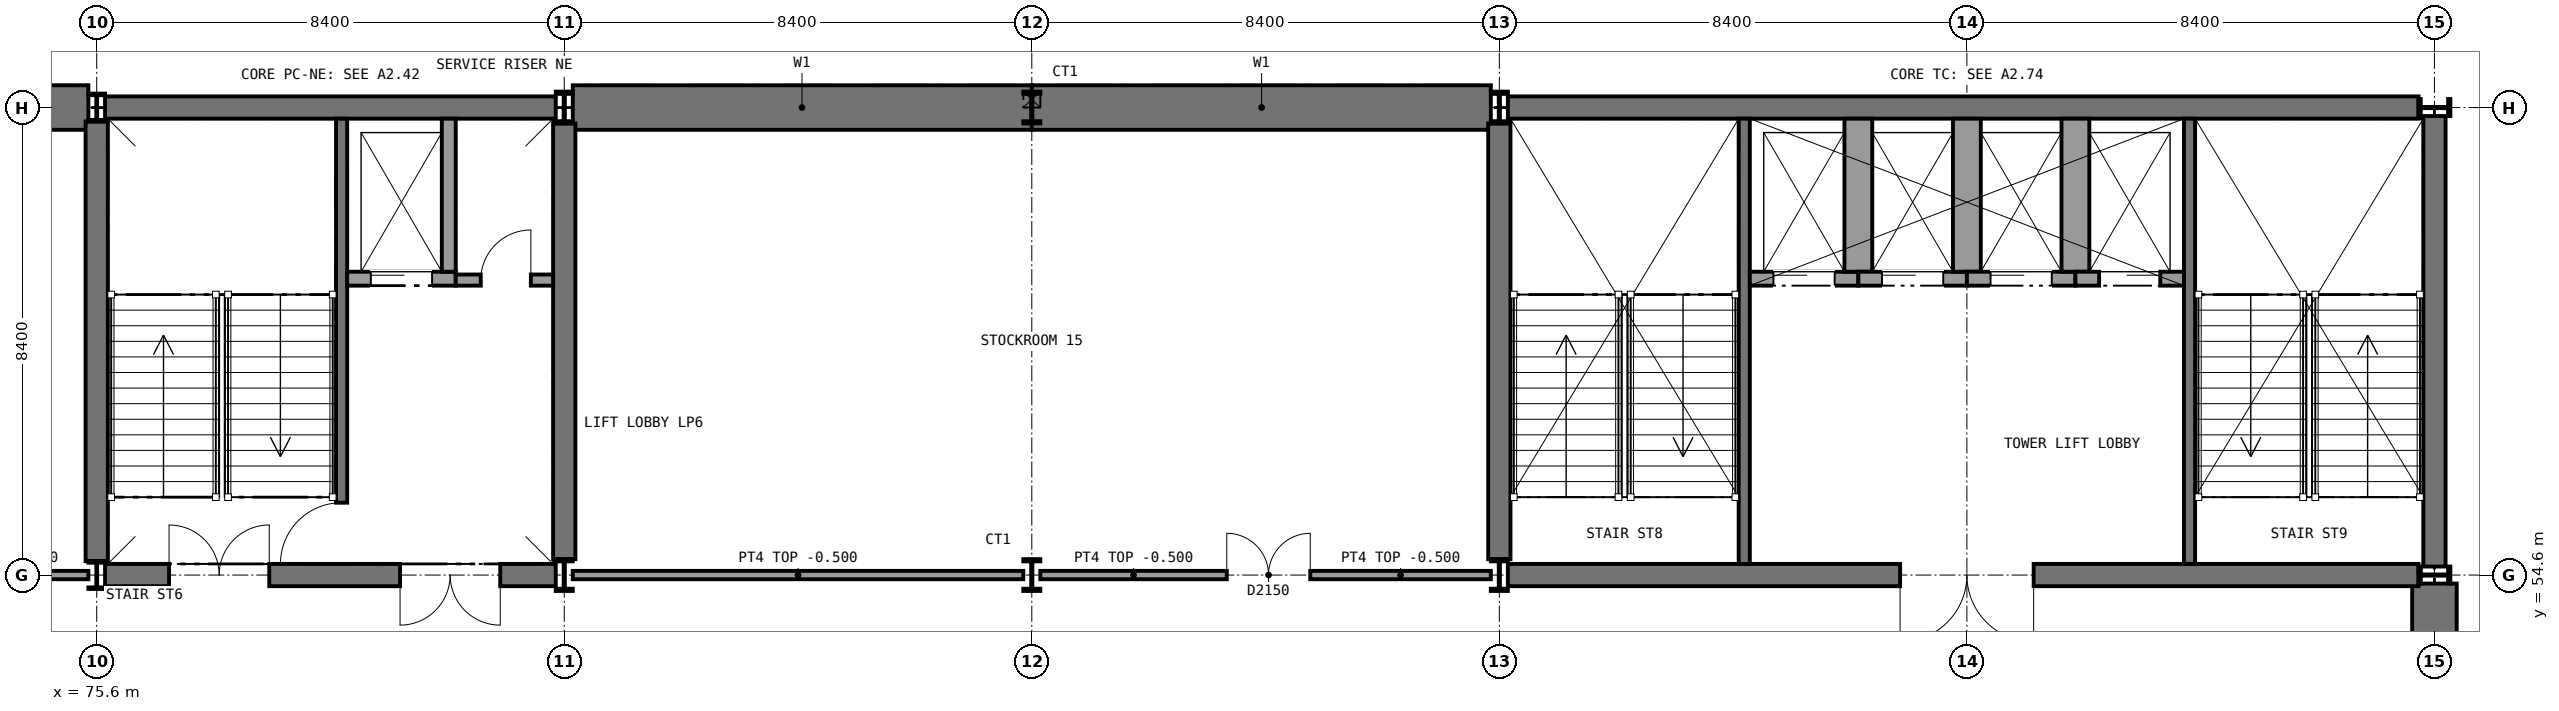
"""IFC4 building model, lengths in metres.
Left out: names, types, materials, properties, quantities, classifications, styles, units other than length and angle.
Written with IfcOpenShell. Run it as: python <this file> out.ifc"""

import sys

from ifc_helpers import new_model, si_unit, direction, frame, frame_2d, origin, origin_2d, place, context, subcontext, project, spatial, rectangle, i_section, extrude, element, fill, save


model = new_model("IFC4")
c1 = context("Model", 3, precision=1e-05, world=origin(), true_north=direction((0.0, 1.0)))
c2 = subcontext(c1, "Body", "Model", "MODEL_VIEW")
j1 = project(units=[si_unit("LENGTHUNIT", "METRE"), si_unit("PLANEANGLEUNIT", "RADIAN")], contexts=[c1])
p1 = place(None, origin())
s1 = spatial("IfcSite", under=j1, at=p1, CompositionType="ELEMENT")
p2 = place(p1, origin())
s2 = spatial("IfcBuilding", under=s1, at=p2, CompositionType="ELEMENT")
p3 = place(p2, frame((0.0, 0.0, -4.9)))
s3 = spatial("IfcBuildingStorey", under=s2, at=p3, CompositionType="ELEMENT", Elevation=-4.9)
p4 = place(p3, frame((67.35, 63.0, 0.0), z_axis=(0.0, 0.0, 1.0), x_axis=(1.0, 0.0, 0.0)))
e1 = element("IfcWall", 1, at=p4, inside=s3, PredefinedType="SOLIDWALL", context=c2, shape_type="SweptSolid", body=[
    extrude(rectangle(XDim=8.1, YDim=0.8, at=frame_2d((4.05, 0.0))), origin(), (0.0, 0.0, 1.0), 4.75),
])
p5 = place(p3, frame((84.153, 63.0, 0.0), z_axis=(0.0, 0.0, 1.0), x_axis=(1.0, 0.0, 0.0)))
e2 = element("IfcWall", 2, at=p5, inside=s3, PredefinedType="SOLIDWALL", context=c2, shape_type="SweptSolid", body=[
    extrude(rectangle(XDim=8.247, YDim=0.8, at=frame_2d((4.124, 0.0))), origin(), (0.0, 0.0, 1.0), 4.75),
])
for number, where, z_axis, x_axis in (
    (3, (92.4, 63.0, 0.0), (0.0, 0.0, 1.0), (1.0, 0.0, 0.0)),
    (4, (117.6, 46.2, 0.0), (0.0, 0.0, 1.0), (0.0, 1.0, 0.0)),
):
    element("IfcWall", number, at=place(p3, frame(where, z_axis=z_axis, x_axis=x_axis)), inside=s3, PredefinedType="SOLIDWALL", context=c2, shape_type="SweptSolid", body=[
        extrude(rectangle(XDim=8.247, YDim=0.8, at=frame_2d((4.124, 0.0))), origin(), (0.0, 0.0, 1.0), 4.75),
    ])
p6 = place(p3, frame((75.75, 63.0, 0.0), z_axis=(0.0, 0.0, 1.0), x_axis=(1.0, 0.0, 0.0)))
e5 = element("IfcWall", 5, at=p6, inside=s3, PredefinedType="SHEAR", context=c2, shape_type="SweptSolid", body=[
    extrude(rectangle(XDim=8.097, YDim=0.4, at=frame_2d((4.048, 0.0))), origin(), (0.0, 0.0, 1.0), 4.75),
])
p7 = place(p3, frame((75.75, 54.6, 0.0), z_axis=(0.0, 0.0, 1.0), x_axis=(1.0, 0.0, 0.0)))
e6 = element("IfcWall", 6, at=p7, inside=s3, PredefinedType="SHEAR", context=c2, shape_type="SweptSolid", body=[
    extrude(rectangle(XDim=8.097, YDim=0.4, at=frame_2d((4.048, 0.0))), origin(), (0.0, 0.0, 1.0), 4.75),
])
p8 = place(p7, frame((1.15, 0.0, 0.0)))
e7 = element("IfcOpeningElement", 7, at=p8, cuts=e6, PredefinedType="OPENING", context=c2, shape_type="SweptSolid", body=[
    extrude(rectangle(XDim=1.8, YDim=2.1, at=frame_2d((0.9, 1.05))), frame((0.0, 0.21, 0.0), z_axis=(0.0, -1.0, 0.0), x_axis=(1.0, 0.0, 0.0)), (0.0, 0.0, 1.0), 0.42),
])
p9 = place(p7, frame((5.3, 0.0, 0.0)))
e8 = element("IfcOpeningElement", 8, at=p9, cuts=e6, PredefinedType="OPENING", context=c2, shape_type="SweptSolid", body=[
    extrude(rectangle(XDim=1.8, YDim=2.1, at=frame_2d((0.9, 1.05))), frame((0.0, 0.21, 0.0), z_axis=(0.0, -1.0, 0.0), x_axis=(1.0, 0.0, 0.0)), (0.0, 0.0, 1.0), 0.42),
])
p10 = place(p3, frame((75.6, 54.85, 0.0), z_axis=(0.0, 0.0, 1.0), x_axis=(0.0, 1.0, 0.0)))
e9 = element("IfcWall", 9, at=p10, inside=s3, PredefinedType="SHEAR", context=c2, shape_type="SweptSolid", body=[
    extrude(rectangle(XDim=7.9, YDim=0.4, at=frame_2d((3.95, 0.0))), origin(), (0.0, 0.0, 1.0), 4.75),
])
p11 = place(p3, frame((84.0, 54.886, 0.0), z_axis=(0.0, 0.0, 1.0), x_axis=(0.0, 1.0, 0.0)))
e10 = element("IfcWall", 10, at=p11, inside=s3, PredefinedType="SHEAR", context=c2, shape_type="SweptSolid", body=[
    extrude(rectangle(XDim=7.828, YDim=0.4, at=frame_2d((3.914, 0.0))), origin(), (0.0, 0.0, 1.0), 4.75),
])
p12 = place(p3, frame((100.953, 63.0, 0.0), z_axis=(0.0, 0.0, 1.0), x_axis=(1.0, 0.0, 0.0)))
e11 = element("IfcWall", 11, at=p12, inside=s3, PredefinedType="SHEAR", context=c2, shape_type="SweptSolid", body=[
    extrude(rectangle(XDim=16.361, YDim=0.4, at=frame_2d((8.181, 0.0))), origin(), (0.0, 0.0, 1.0), 4.75),
])
p13 = place(p3, frame((100.953, 54.6, 0.0), z_axis=(0.0, 0.0, 1.0), x_axis=(1.0, 0.0, 0.0)))
e12 = element("IfcWall", 12, at=p13, inside=s3, PredefinedType="SHEAR", context=c2, shape_type="SweptSolid", body=[
    extrude(rectangle(XDim=16.361, YDim=0.4, at=frame_2d((8.181, 0.0))), origin(), (0.0, 0.0, 1.0), 4.75),
])
p14 = place(p13, frame((7.047, 0.0, 0.0)))
e13 = element("IfcOpeningElement", 13, at=p14, cuts=e12, PredefinedType="OPENING", context=c2, shape_type="SweptSolid", body=[
    extrude(rectangle(XDim=2.4, YDim=2.4, at=frame_2d((1.2, 1.2))), frame((0.0, 0.21, 0.0), z_axis=(0.0, -1.0, 0.0), x_axis=(1.0, 0.0, 0.0)), (0.0, 0.0, 1.0), 0.42),
])
p15 = place(p3, frame((100.8, 54.886, 0.0), z_axis=(0.0, 0.0, 1.0), x_axis=(0.0, 1.0, 0.0)))
e14 = element("IfcWall", 14, at=p15, inside=s3, PredefinedType="SHEAR", context=c2, shape_type="SweptSolid", body=[
    extrude(rectangle(XDim=7.828, YDim=0.4, at=frame_2d((3.914, 0.0))), origin(), (0.0, 0.0, 1.0), 4.75),
])
p16 = place(p3, frame((117.6, 54.753, 0.0), z_axis=(0.0, 0.0, 1.0), x_axis=(0.0, 1.0, 0.0)))
e15 = element("IfcWall", 15, at=p16, inside=s3, PredefinedType="SHEAR", context=c2, shape_type="SweptSolid", body=[
    extrude(rectangle(XDim=8.094, YDim=0.4, at=frame_2d((4.047, 0.0))), origin(), (0.0, 0.0, 1.0), 4.75),
])
for number, where, z_axis, x_axis in (
    (16, (75.6, 54.6, 0.0), (0.0, 0.0, 1.0), (1.0, 0.0, 0.0)),
    (17, (75.6, 63.0, 0.0), (0.0, 0.0, 1.0), (1.0, 0.0, 0.0)),
):
    element("IfcColumn", number, at=place(p3, frame(where, z_axis=z_axis, x_axis=x_axis)), inside=s3, PredefinedType="COLUMN", context=c2, shape_type="SweptSolid", body=[
        extrude(i_section(OverallWidth=0.3, OverallDepth=0.5, WebThickness=0.014, FlangeThickness=0.028, FilletRadius=0.027, at=origin_2d()), origin(), (0.0, 0.0, 1.0), 4.9),
    ])
for number, where, z_axis, x_axis in (
    (18, (84.0, 54.6, 0.0), (0.0, 0.0, 1.0), (1.0, 0.0, 0.0)),
    (19, (84.0, 63.0, 0.0), (0.0, 0.0, 1.0), (1.0, 0.0, 0.0)),
    (20, (92.4, 54.6, 0.0), (0.0, 0.0, 1.0), (1.0, 0.0, 0.0)),
    (21, (92.4, 63.0, 0.0), (0.0, 0.0, 1.0), (1.0, 0.0, 0.0)),
    (22, (100.8, 54.6, 0.0), (0.0, 0.0, 1.0), (1.0, 0.0, 0.0)),
    (23, (100.8, 63.0, 0.0), (0.0, 0.0, 1.0), (1.0, 0.0, 0.0)),
    (24, (117.6, 54.6, 0.0), (0.0, 0.0, 1.0), (0.0, 1.0, 0.0)),
    (25, (117.6, 63.0, 0.0), (0.0, 0.0, 1.0), (0.0, 1.0, 0.0)),
):
    element("IfcColumn", number, at=place(p3, frame(where, z_axis=z_axis, x_axis=x_axis)), inside=s3, PredefinedType="COLUMN", context=c2, shape_type="SweptSolid", body=[
        extrude(i_section(OverallWidth=0.306, OverallDepth=0.572, WebThickness=0.021, FlangeThickness=0.04, FilletRadius=0.027, at=origin_2d()), origin(), (0.0, 0.0, 1.0), 4.9),
    ])
p17 = place(p3, frame((67.35, 54.6, 0.0), z_axis=(0.0, 0.0, 1.0), x_axis=(1.0, 0.0, 0.0)))
e26 = element("IfcWall", 26, at=p17, inside=s3, PredefinedType="SOLIDWALL", context=c2, shape_type="SweptSolid", body=[
    extrude(rectangle(XDim=8.1, YDim=0.15, at=frame_2d((4.05, 0.0))), origin(), (0.0, 0.0, 1.0), 4.26),
])
p18 = place(p17, frame((3.35, 0.0, 0.0)))
e27 = element("IfcOpeningElement", 27, at=p18, cuts=e26, PredefinedType="OPENING", context=c2, shape_type="SweptSolid", body=[
    extrude(rectangle(XDim=1.5, YDim=2.1, at=frame_2d((0.75, 1.05))), frame((0.0, 0.085, 0.0), z_axis=(0.0, -1.0, 0.0), x_axis=(1.0, 0.0, 0.0)), (0.0, 0.0, 1.0), 0.17),
])
p19 = place(p3, frame((84.153, 54.6, 0.0), z_axis=(0.0, 0.0, 1.0), x_axis=(1.0, 0.0, 0.0)))
e28 = element("IfcWall", 28, at=p19, inside=s3, PredefinedType="SOLIDWALL", context=c2, shape_type="SweptSolid", body=[
    extrude(rectangle(XDim=8.094, YDim=0.15, at=frame_2d((4.047, 0.0))), origin(), (0.0, 0.0, 1.0), 4.4),
])
p20 = place(p3, frame((92.553, 54.6, 0.0), z_axis=(0.0, 0.0, 1.0), x_axis=(1.0, 0.0, 0.0)))
e29 = element("IfcWall", 29, at=p20, inside=s3, PredefinedType="SOLIDWALL", context=c2, shape_type="SweptSolid", body=[
    extrude(rectangle(XDim=8.094, YDim=0.15, at=frame_2d((4.047, 0.0))), origin(), (0.0, 0.0, 1.0), 4.4),
])
p21 = place(p20, frame((3.35, 0.0, 0.0)))
e30 = element("IfcOpeningElement", 30, at=p21, cuts=e29, PredefinedType="OPENING", context=c2, shape_type="SweptSolid", body=[
    extrude(rectangle(XDim=1.5, YDim=2.1, at=frame_2d((0.75, 1.05))), frame((0.0, 0.085, 0.0), z_axis=(0.0, -1.0, 0.0), x_axis=(1.0, 0.0, 0.0)), (0.0, 0.0, 1.0), 0.17),
])
p22 = place(p3, frame((80.0, 62.8, 0.0), z_axis=(0.0, 0.0, 1.0), x_axis=(0.0, -1.0, 0.0)))
e31 = element("IfcWall", 31, at=p22, inside=s3, PredefinedType="SHEAR", context=c2, shape_type="SweptSolid", body=[
    extrude(rectangle(XDim=8.0, YDim=0.2, at=frame_2d((4.0, 0.0))), origin(), (0.0, 0.0, 1.0), 4.75),
])
p23 = place(p22, frame((6.9, 0.0, 0.0)))
e32 = element("IfcOpeningElement", 32, at=p23, cuts=e31, PredefinedType="OPENING", context=c2, shape_type="SweptSolid", body=[
    extrude(rectangle(XDim=1.11, YDim=2.1, at=frame_2d((0.555, 1.05))), frame((0.0, 0.11, 0.0), z_axis=(0.0, -1.0, 0.0), x_axis=(1.0, 0.0, 0.0)), (0.0, 0.0, 1.0), 0.22),
])
p24 = place(p3, frame((80.1, 59.925, 0.0), z_axis=(0.0, 0.0, 1.0), x_axis=(1.0, 0.0, 0.0)))
e33 = element("IfcWall", 33, at=p24, inside=s3, PredefinedType="SOLIDWALL", context=c2, shape_type="SweptSolid", body=[
    extrude(rectangle(XDim=1.95, YDim=0.25, at=frame_2d((0.975, 0.0))), origin(), (0.0, 0.0, 1.0), 4.9),
])
p25 = place(p24, frame((0.425, 0.0, 0.0)))
e34 = element("IfcOpeningElement", 34, at=p25, cuts=e33, PredefinedType="OPENING", context=c2, shape_type="SweptSolid", body=[
    extrude(rectangle(XDim=1.1, YDim=2.1, at=frame_2d((0.55, 1.05))), frame((0.0, 0.135, 0.0), z_axis=(0.0, -1.0, 0.0), x_axis=(1.0, 0.0, 0.0)), (0.0, 0.0, 1.0), 0.27),
])
p26 = place(p3, frame((81.925, 62.8, 0.0), z_axis=(0.0, 0.0, 1.0), x_axis=(0.0, -1.0, 0.0)))
e35 = element("IfcWall", 35, at=p26, inside=s3, PredefinedType="SOLIDWALL", context=c2, shape_type="SweptSolid", body=[
    extrude(rectangle(XDim=2.75, YDim=0.25, at=frame_2d((1.375, 0.0))), origin(), (0.0, 0.0, 1.0), 4.9),
])
p27 = place(p3, frame((82.05, 59.9, 0.0), z_axis=(0.0, 0.0, 1.0), x_axis=(1.0, 0.0, 0.0)))
e36 = element("IfcWall", 36, at=p27, inside=s3, PredefinedType="PARTITIONING", context=c2, shape_type="SweptSolid", body=[
    extrude(rectangle(XDim=1.75, YDim=0.2, at=frame_2d((0.875, 0.0))), origin(), (0.0, 0.0, 1.0), 4.75),
])
p28 = place(p27, frame((0.45, 0.0, 0.0)))
e37 = element("IfcOpeningElement", 37, at=p28, cuts=e36, PredefinedType="OPENING", context=c2, shape_type="SweptSolid", body=[
    extrude(rectangle(XDim=0.9, YDim=2.1, at=frame_2d((0.45, 1.05))), frame((0.0, 0.11, 0.0), z_axis=(0.0, -1.0, 0.0), x_axis=(1.0, 0.0, 0.0)), (0.0, 0.0, 1.0), 0.22),
])
for number, where, z_axis, x_axis in (
    (38, (105.2, 62.8, 0.0), (0.0, 0.0, 1.0), (0.0, -1.0, 0.0)),
    (39, (113.2, 62.8, 0.0), (0.0, 0.0, 1.0), (0.0, -1.0, 0.0)),
):
    element("IfcWall", number, at=place(p3, frame(where, z_axis=z_axis, x_axis=x_axis)), inside=s3, PredefinedType="SHEAR", context=c2, shape_type="SweptSolid", body=[
        extrude(rectangle(XDim=8.0, YDim=0.2, at=frame_2d((4.0, 0.0))), origin(), (0.0, 0.0, 1.0), 4.75),
    ])
p29 = place(p3, frame((105.3, 59.925, 0.0), z_axis=(0.0, 0.0, 1.0), x_axis=(1.0, 0.0, 0.0)))
e40 = element("IfcWall", 40, at=p29, inside=s3, PredefinedType="SOLIDWALL", context=c2, shape_type="SweptSolid", body=[
    extrude(rectangle(XDim=1.95, YDim=0.25, at=frame_2d((0.975, 0.0))), origin(), (0.0, 0.0, 1.0), 4.9),
])
p30 = place(p29, frame((0.425, 0.0, 0.0)))
e41 = element("IfcOpeningElement", 41, at=p30, cuts=e40, PredefinedType="OPENING", context=c2, shape_type="SweptSolid", body=[
    extrude(rectangle(XDim=1.1, YDim=2.1, at=frame_2d((0.55, 1.05))), frame((0.0, 0.135, 0.0), z_axis=(0.0, -1.0, 0.0), x_axis=(1.0, 0.0, 0.0)), (0.0, 0.0, 1.0), 0.27),
])
p31 = place(p3, frame((107.25, 62.8, 0.0), z_axis=(0.0, 0.0, 1.0), x_axis=(0.0, -1.0, 0.0)))
e42 = element("IfcWall", 42, at=p31, inside=s3, PredefinedType="SOLIDWALL", context=c2, shape_type="SweptSolid", body=[
    extrude(rectangle(XDim=2.75, YDim=0.5, at=frame_2d((1.375, 0.0))), origin(), (0.0, 0.0, 1.0), 4.9),
])
p32 = place(p3, frame((107.25, 59.925, 0.0), z_axis=(0.0, 0.0, 1.0), x_axis=(1.0, 0.0, 0.0)))
e43 = element("IfcWall", 43, at=p32, inside=s3, PredefinedType="SOLIDWALL", context=c2, shape_type="SweptSolid", body=[
    extrude(rectangle(XDim=1.95, YDim=0.25, at=frame_2d((0.975, 0.0))), origin(), (0.0, 0.0, 1.0), 4.9),
])
p33 = place(p32, frame((0.425, 0.0, 0.0)))
e44 = element("IfcOpeningElement", 44, at=p33, cuts=e43, PredefinedType="OPENING", context=c2, shape_type="SweptSolid", body=[
    extrude(rectangle(XDim=1.1, YDim=2.1, at=frame_2d((0.55, 1.05))), frame((0.0, 0.135, 0.0), z_axis=(0.0, -1.0, 0.0), x_axis=(1.0, 0.0, 0.0)), (0.0, 0.0, 1.0), 0.27),
])
p34 = place(p3, frame((109.2, 62.8, 0.0), z_axis=(0.0, 0.0, 1.0), x_axis=(0.0, -1.0, 0.0)))
e45 = element("IfcWall", 45, at=p34, inside=s3, PredefinedType="SOLIDWALL", context=c2, shape_type="SweptSolid", body=[
    extrude(rectangle(XDim=2.75, YDim=0.5, at=frame_2d((1.375, 0.0))), origin(), (0.0, 0.0, 1.0), 4.9),
])
p35 = place(p3, frame((109.2, 59.925, 0.0), z_axis=(0.0, 0.0, 1.0), x_axis=(1.0, 0.0, 0.0)))
e46 = element("IfcWall", 46, at=p35, inside=s3, PredefinedType="SOLIDWALL", context=c2, shape_type="SweptSolid", body=[
    extrude(rectangle(XDim=1.95, YDim=0.25, at=frame_2d((0.975, 0.0))), origin(), (0.0, 0.0, 1.0), 4.9),
])
p36 = place(p35, frame((0.425, 0.0, 0.0)))
e47 = element("IfcOpeningElement", 47, at=p36, cuts=e46, PredefinedType="OPENING", context=c2, shape_type="SweptSolid", body=[
    extrude(rectangle(XDim=1.1, YDim=2.1, at=frame_2d((0.55, 1.05))), frame((0.0, 0.135, 0.0), z_axis=(0.0, -1.0, 0.0), x_axis=(1.0, 0.0, 0.0)), (0.0, 0.0, 1.0), 0.27),
])
p37 = place(p3, frame((111.15, 62.8, 0.0), z_axis=(0.0, 0.0, 1.0), x_axis=(0.0, -1.0, 0.0)))
e48 = element("IfcWall", 48, at=p37, inside=s3, PredefinedType="SOLIDWALL", context=c2, shape_type="SweptSolid", body=[
    extrude(rectangle(XDim=2.75, YDim=0.5, at=frame_2d((1.375, 0.0))), origin(), (0.0, 0.0, 1.0), 4.9),
])
p38 = place(p3, frame((111.15, 59.925, 0.0), z_axis=(0.0, 0.0, 1.0), x_axis=(1.0, 0.0, 0.0)))
e49 = element("IfcWall", 49, at=p38, inside=s3, PredefinedType="SOLIDWALL", context=c2, shape_type="SweptSolid", body=[
    extrude(rectangle(XDim=1.95, YDim=0.25, at=frame_2d((0.975, 0.0))), origin(), (0.0, 0.0, 1.0), 4.9),
])
p39 = place(p38, frame((0.425, 0.0, 0.0)))
e50 = element("IfcOpeningElement", 50, at=p39, cuts=e49, PredefinedType="OPENING", context=c2, shape_type="SweptSolid", body=[
    extrude(rectangle(XDim=1.1, YDim=2.1, at=frame_2d((0.55, 1.05))), frame((0.0, 0.135, 0.0), z_axis=(0.0, -1.0, 0.0), x_axis=(1.0, 0.0, 0.0)), (0.0, 0.0, 1.0), 0.27),
])
p40 = place(p21, origin())
e51 = element("IfcDoor", 51, at=p40, inside=s3, OperationType="DOUBLE_DOOR_SINGLE_SWING", PredefinedType="DOOR", context=c2, shape_type="SweptSolid", body=[
    extrude(rectangle(XDim=1.5, YDim=2.1, at=frame_2d((0.75, 1.05))), frame((0.0, 0.025, 0.0), z_axis=(0.0, -1.0, 0.0), x_axis=(1.0, 0.0, 0.0)), (0.0, 0.0, 1.0), 0.05),
])
fill(e30, e51)
p41 = place(p23, frame((1.1, 0.0, 0.0), z_axis=(0.0, 0.0, 1.0), x_axis=(-1.0, 0.0, 0.0)))
e52 = element("IfcDoor", 52, at=p41, inside=s3, OperationType="SINGLE_SWING_LEFT", PredefinedType="DOOR", context=c2, shape_type="SweptSolid", body=[
    extrude(rectangle(XDim=1.1, YDim=2.1, at=frame_2d((0.55, 1.05))), frame((0.0, 0.025, 0.0), z_axis=(0.0, -1.0, 0.0), x_axis=(1.0, 0.0, 0.0)), (0.0, 0.0, 1.0), 0.05),
])
fill(e32, e52)
p42 = place(p25, frame((1.1, 0.0, 0.0), z_axis=(0.0, 0.0, 1.0), x_axis=(-1.0, 0.0, 0.0)))
e53 = element("IfcDoor", 53, at=p42, inside=s3, OperationType="SLIDING_TO_RIGHT", PredefinedType="DOOR", context=c2, shape_type="SweptSolid", body=[
    extrude(rectangle(XDim=1.1, YDim=2.1, at=frame_2d((0.55, 1.05))), frame((0.0, 0.025, 0.0), z_axis=(0.0, -1.0, 0.0), x_axis=(1.0, 0.0, 0.0)), (0.0, 0.0, 1.0), 0.05),
])
fill(e34, e53)
p43 = place(p28, origin())
e54 = element("IfcDoor", 54, at=p43, inside=s3, OperationType="SINGLE_SWING_RIGHT", PredefinedType="DOOR", context=c2, shape_type="SweptSolid", body=[
    extrude(rectangle(XDim=0.9, YDim=2.1, at=frame_2d((0.45, 1.05))), frame((0.0, 0.025, 0.0), z_axis=(0.0, -1.0, 0.0), x_axis=(1.0, 0.0, 0.0)), (0.0, 0.0, 1.0), 0.05),
])
fill(e37, e54)
p44 = place(p8, origin())
e55 = element("IfcDoor", 55, at=p44, inside=s3, OperationType="DOUBLE_DOOR_SINGLE_SWING", PredefinedType="DOOR", context=c2, shape_type="SweptSolid", body=[
    extrude(rectangle(XDim=1.8, YDim=2.1, at=frame_2d((0.9, 1.05))), frame((0.0, 0.025, 0.0), z_axis=(0.0, -1.0, 0.0), x_axis=(1.0, 0.0, 0.0)), (0.0, 0.0, 1.0), 0.05),
])
fill(e7, e55)
p45 = place(p9, frame((1.8, 0.0, 0.0), z_axis=(0.0, 0.0, 1.0), x_axis=(-1.0, 0.0, 0.0)))
e56 = element("IfcDoor", 56, at=p45, inside=s3, OperationType="DOUBLE_DOOR_SINGLE_SWING", PredefinedType="DOOR", context=c2, shape_type="SweptSolid", body=[
    extrude(rectangle(XDim=1.8, YDim=2.1, at=frame_2d((0.9, 1.05))), frame((0.0, 0.025, 0.0), z_axis=(0.0, -1.0, 0.0), x_axis=(1.0, 0.0, 0.0)), (0.0, 0.0, 1.0), 0.05),
])
fill(e8, e56)
p46 = place(p30, frame((1.1, 0.0, 0.0), z_axis=(0.0, 0.0, 1.0), x_axis=(-1.0, 0.0, 0.0)))
e57 = element("IfcDoor", 57, at=p46, inside=s3, OperationType="SLIDING_TO_RIGHT", PredefinedType="DOOR", context=c2, shape_type="SweptSolid", body=[
    extrude(rectangle(XDim=1.1, YDim=2.1, at=frame_2d((0.55, 1.05))), frame((0.0, 0.025, 0.0), z_axis=(0.0, -1.0, 0.0), x_axis=(1.0, 0.0, 0.0)), (0.0, 0.0, 1.0), 0.05),
])
fill(e41, e57)
p47 = place(p33, frame((1.1, 0.0, 0.0), z_axis=(0.0, 0.0, 1.0), x_axis=(-1.0, 0.0, 0.0)))
e58 = element("IfcDoor", 58, at=p47, inside=s3, OperationType="SLIDING_TO_RIGHT", PredefinedType="DOOR", context=c2, shape_type="SweptSolid", body=[
    extrude(rectangle(XDim=1.1, YDim=2.1, at=frame_2d((0.55, 1.05))), frame((0.0, 0.025, 0.0), z_axis=(0.0, -1.0, 0.0), x_axis=(1.0, 0.0, 0.0)), (0.0, 0.0, 1.0), 0.05),
])
fill(e44, e58)
p48 = place(p36, frame((1.1, 0.0, 0.0), z_axis=(0.0, 0.0, 1.0), x_axis=(-1.0, 0.0, 0.0)))
e59 = element("IfcDoor", 59, at=p48, inside=s3, OperationType="SLIDING_TO_RIGHT", PredefinedType="DOOR", context=c2, shape_type="SweptSolid", body=[
    extrude(rectangle(XDim=1.1, YDim=2.1, at=frame_2d((0.55, 1.05))), frame((0.0, 0.025, 0.0), z_axis=(0.0, -1.0, 0.0), x_axis=(1.0, 0.0, 0.0)), (0.0, 0.0, 1.0), 0.05),
])
fill(e47, e59)
p49 = place(p39, frame((1.1, 0.0, 0.0), z_axis=(0.0, 0.0, 1.0), x_axis=(-1.0, 0.0, 0.0)))
e60 = element("IfcDoor", 60, at=p49, inside=s3, OperationType="SLIDING_TO_LEFT", PredefinedType="DOOR", context=c2, shape_type="SweptSolid", body=[
    extrude(rectangle(XDim=1.1, YDim=2.1, at=frame_2d((0.55, 1.05))), frame((0.0, 0.025, 0.0), z_axis=(0.0, -1.0, 0.0), x_axis=(1.0, 0.0, 0.0)), (0.0, 0.0, 1.0), 0.05),
])
fill(e50, e60)
p50 = place(p14, frame((2.4, 0.0, 0.0), z_axis=(0.0, 0.0, 1.0), x_axis=(-1.0, 0.0, 0.0)))
e61 = element("IfcDoor", 61, at=p50, inside=s3, OperationType="DOUBLE_DOOR_SINGLE_SWING", PredefinedType="DOOR", context=c2, shape_type="SweptSolid", body=[
    extrude(rectangle(XDim=2.4, YDim=2.4, at=frame_2d((1.2, 1.2))), frame((0.0, 0.025, 0.0), z_axis=(0.0, -1.0, 0.0), x_axis=(1.0, 0.0, 0.0)), (0.0, 0.0, 1.0), 0.05),
])
fill(e13, e61)
save(model, sys.argv[1])
